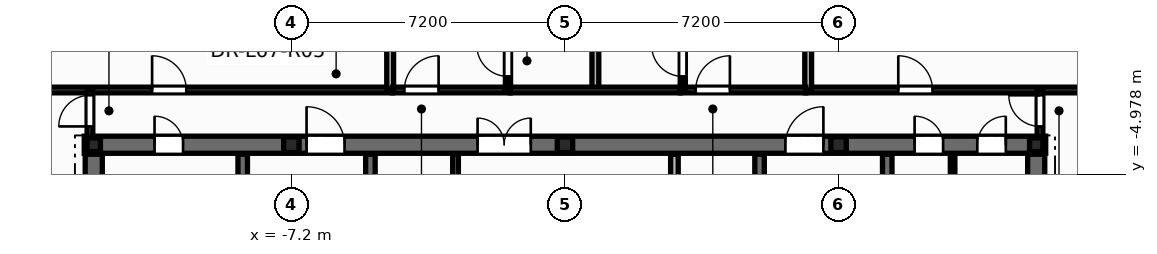
"""IFC4 building model, lengths in metres.
Left out: names, types, materials, properties, quantities, classifications, styles, units other than length and angle.
Written with IfcOpenShell. Run it as: python <this file> out.ifc"""

import sys

from ifc_helpers import new_model, si_unit, direction, frame, frame_2d, origin, origin_2d, place, context, subcontext, project, spatial, rectangle, i_section, extrude, element, fill, save


model = new_model("IFC4")
c1 = context("Model", 3, precision=1e-05, world=origin(), true_north=direction((0.0, 1.0)))
c2 = subcontext(c1, "Body", "Model", "MODEL_VIEW")
j1 = project(units=[si_unit("LENGTHUNIT", "METRE"), si_unit("PLANEANGLEUNIT", "RADIAN")], contexts=[c1])
p1 = place(None, origin())
s1 = spatial("IfcSite", under=j1, at=p1, CompositionType="ELEMENT")
p2 = place(p1, origin())
s2 = spatial("IfcBuilding", under=s1, at=p2, CompositionType="ELEMENT")
p3 = place(p2, frame((0.0, 0.0, 256.2)))
s3 = spatial("IfcBuildingStorey", under=s2, at=p3, CompositionType="ELEMENT", Elevation=256.2)
for number, where, z_axis, x_axis in (
    (1, (12.4, -4.2, 0.0), (0.0, 0.0, 1.0), (1.0, 0.0, 0.0)),
    (2, (-12.4, -4.2, 0.0), (0.0, 0.0, 1.0), (1.0, 0.0, 0.0)),
):
    element("IfcColumn", number, at=place(p3, frame(where, z_axis=z_axis, x_axis=x_axis)), inside=s3, PredefinedType="COLUMN", context=c2, shape_type="SweptSolid", body=[
        extrude(i_section(OverallWidth=0.352, OverallDepth=0.359, WebThickness=0.018, FlangeThickness=0.026, at=origin_2d()), origin(), (0.0, 0.0, 1.0), 3.6),
    ])
for number, where, z_axis, x_axis in (
    (3, (-7.2, -4.2, 0.0), (0.0, 0.0, 1.0), (1.0, 0.0, 0.0)),
    (4, (0.0, -4.2, 0.0), (0.0, 0.0, 1.0), (1.0, 0.0, 0.0)),
    (5, (7.2, -4.2, 0.0), (0.0, 0.0, 1.0), (1.0, 0.0, 0.0)),
):
    element("IfcColumn", number, at=place(p3, frame(where, z_axis=z_axis, x_axis=x_axis)), inside=s3, PredefinedType="PILASTER", context=c2, shape_type="SweptSolid", body=[
        extrude(i_section(OverallWidth=0.405, OverallDepth=0.414, WebThickness=0.022, FlangeThickness=0.032, at=origin_2d()), origin(), (0.0, 0.0, 1.0), 3.6),
    ])
p4 = place(p3, frame((-2.88, -5.6, 0.0), z_axis=(0.0, 0.0, 1.0), x_axis=(0.0, 1.0, 0.0)))
e6 = element("IfcWall", 6, at=p4, inside=s3, PredefinedType="PARTITIONING", context=c2, shape_type="SweptSolid", body=[
    extrude(rectangle(XDim=1.15, YDim=0.15, at=frame_2d((0.575, 0.0))), origin(), (0.0, 0.0, 1.0), 3.345),
])
p5 = place(p3, frame((10.2, -5.52, 0.0), z_axis=(0.0, 0.0, 1.0), x_axis=(0.0, 1.0, 0.0)))
e7 = element("IfcWall", 7, at=p5, inside=s3, PredefinedType="PARTITIONING", context=c2, shape_type="SweptSolid", body=[
    extrude(rectangle(XDim=1.12, YDim=0.12, at=frame_2d((0.56, 0.0))), origin(), (0.0, 0.0, 1.0), 3.345),
])
p6 = place(p3, frame((-12.65, -4.2, 0.0), z_axis=(0.0, 0.0, 1.0), x_axis=(1.0, 0.0, 0.0)))
e8 = element("IfcWall", 8, at=p6, inside=s3, PredefinedType="SHEAR", context=c2, shape_type="SweptSolid", body=[
    extrude(rectangle(XDim=25.3, YDim=0.45, at=frame_2d((12.65, 0.0))), origin(), (0.0, 0.0, 1.0), 3.6),
])
p7 = place(p6, frame((1.85, 0.0, 0.0)))
e9 = element("IfcOpeningElement", 9, at=p7, cuts=e8, PredefinedType="OPENING", context=c2, shape_type="SweptSolid", body=[
    extrude(rectangle(XDim=0.756, YDim=2.054, at=frame_2d((0.375, 1.027))), frame((0.0, 0.235, 0.0), z_axis=(0.0, -1.0, 0.0), x_axis=(1.0, 0.0, 0.0)), (0.0, 0.0, 1.0), 0.47),
])
p8 = place(p6, frame((21.85, 0.0, 0.0)))
e10 = element("IfcOpeningElement", 10, at=p8, cuts=e8, PredefinedType="OPENING", context=c2, shape_type="SweptSolid", body=[
    extrude(rectangle(XDim=0.756, YDim=2.054, at=frame_2d((0.375, 1.027))), frame((0.0, 0.235, 0.0), z_axis=(0.0, -1.0, 0.0), x_axis=(1.0, 0.0, 0.0)), (0.0, 0.0, 1.0), 0.47),
])
p9 = place(p6, frame((23.5, 0.0, 0.0)))
e11 = element("IfcOpeningElement", 11, at=p9, cuts=e8, PredefinedType="OPENING", context=c2, shape_type="SweptSolid", body=[
    extrude(rectangle(XDim=0.756, YDim=2.054, at=frame_2d((0.375, 1.027))), frame((0.0, 0.235, 0.0), z_axis=(0.0, -1.0, 0.0), x_axis=(1.0, 0.0, 0.0)), (0.0, 0.0, 1.0), 0.47),
])
p10 = place(p6, frame((5.85, 0.0, 0.0)))
e12 = element("IfcOpeningElement", 12, at=p10, cuts=e8, PredefinedType="OPENING", context=c2, shape_type="SweptSolid", body=[
    extrude(rectangle(XDim=1.006, YDim=2.104, at=frame_2d((0.5, 1.052))), frame((0.0, 0.235, 0.0), z_axis=(0.0, -1.0, 0.0), x_axis=(1.0, 0.0, 0.0)), (0.0, 0.0, 1.0), 0.47),
])
p11 = place(p6, frame((10.35, 0.0, 0.0)))
e13 = element("IfcOpeningElement", 13, at=p11, cuts=e8, PredefinedType="OPENING", context=c2, shape_type="SweptSolid", body=[
    extrude(rectangle(XDim=1.406, YDim=2.154, at=frame_2d((0.7, 1.077))), frame((0.0, 0.235, 0.0), z_axis=(0.0, -1.0, 0.0), x_axis=(1.0, 0.0, 0.0)), (0.0, 0.0, 1.0), 0.47),
])
p12 = place(p6, frame((18.45, 0.0, 0.0)))
e14 = element("IfcOpeningElement", 14, at=p12, cuts=e8, PredefinedType="OPENING", context=c2, shape_type="SweptSolid", body=[
    extrude(rectangle(XDim=1.006, YDim=2.104, at=frame_2d((0.5, 1.052))), frame((0.0, 0.235, 0.0), z_axis=(0.0, -1.0, 0.0), x_axis=(1.0, 0.0, 0.0)), (0.0, 0.0, 1.0), 0.47),
])
p13 = place(p3, frame((-8.48, -13.85, 0.0), z_axis=(0.0, 0.0, 1.0), x_axis=(0.0, 1.0, 0.0)))
e15 = element("IfcWall", 15, at=p13, inside=s3, PredefinedType="SHEAR", context=c2, shape_type="SweptSolid", body=[
    extrude(rectangle(XDim=9.4, YDim=0.25, at=frame_2d((4.7, 0.0))), origin(), (0.0, 0.0, 1.0), 3.6),
])
p14 = place(p13, frame((6.95, 0.0, 0.0)))
e16 = element("IfcOpeningElement", 16, at=p14, cuts=e15, PredefinedType="OPENING", context=c2, shape_type="SweptSolid", body=[
    extrude(rectangle(XDim=1.006, YDim=2.104, at=frame_2d((0.5, 1.052))), frame((0.0, 0.135, 0.0), z_axis=(0.0, -1.0, 0.0), x_axis=(1.0, 0.0, 0.0)), (0.0, 0.0, 1.0), 0.27),
])
p15 = place(p3, frame((8.48, -13.85, 0.0), z_axis=(0.0, 0.0, 1.0), x_axis=(0.0, 1.0, 0.0)))
e17 = element("IfcWall", 17, at=p15, inside=s3, PredefinedType="SHEAR", context=c2, shape_type="SweptSolid", body=[
    extrude(rectangle(XDim=9.4, YDim=0.25, at=frame_2d((4.7, 0.0))), origin(), (0.0, 0.0, 1.0), 3.6),
])
p16 = place(p15, frame((6.95, 0.0, 0.0)))
e18 = element("IfcOpeningElement", 18, at=p16, cuts=e17, PredefinedType="OPENING", context=c2, shape_type="SweptSolid", body=[
    extrude(rectangle(XDim=1.006, YDim=2.104, at=frame_2d((0.5, 1.052))), frame((0.0, 0.135, 0.0), z_axis=(0.0, -1.0, 0.0), x_axis=(1.0, 0.0, 0.0)), (0.0, 0.0, 1.0), 0.27),
])
for number, where, z_axis, x_axis in (
    (19, (-5.12, -13.85, 0.0), (0.0, 0.0, 1.0), (0.0, 1.0, 0.0)),
    (20, (5.12, -13.85, 0.0), (0.0, 0.0, 1.0), (0.0, 1.0, 0.0)),
):
    element("IfcWall", number, at=place(p3, frame(where, z_axis=z_axis, x_axis=x_axis)), inside=s3, PredefinedType="SHEAR", context=c2, shape_type="SweptSolid", body=[
        extrude(rectangle(XDim=9.4, YDim=0.25, at=frame_2d((4.7, 0.0))), origin(), (0.0, 0.0, 1.0), 3.6),
    ])
for number, where, z_axis, x_axis in (
    (21, (-12.4, -13.85, 0.0), (0.0, 0.0, 1.0), (0.0, 1.0, 0.0)),
    (22, (12.4, -13.85, 0.0), (0.0, 0.0, 1.0), (0.0, 1.0, 0.0)),
):
    element("IfcWall", number, at=place(p3, frame(where, z_axis=z_axis, x_axis=x_axis)), inside=s3, PredefinedType="SHEAR", context=c2, shape_type="SweptSolid", body=[
        extrude(rectangle(XDim=9.4, YDim=0.45, at=frame_2d((4.7, 0.0))), origin(), (0.0, 0.0, 1.0), 3.6),
    ])
p17 = place(p3, frame((2.88, -9.45, 0.0), z_axis=(0.0, 0.0, 1.0), x_axis=(0.0, 1.0, 0.0)))
e23 = element("IfcWall", 23, at=p17, inside=s3, PredefinedType="SOLIDWALL", context=c2, shape_type="SweptSolid", body=[
    extrude(rectangle(XDim=5.0, YDim=0.2, at=frame_2d((2.5, 0.0))), origin(), (0.0, 0.0, 1.0), 3.345),
])
p18 = place(p17, frame((2.05, 0.0, 0.0)))
e24 = element("IfcOpeningElement", 24, at=p18, cuts=e23, PredefinedType="OPENING", context=c2, shape_type="SweptSolid", body=[
    extrude(rectangle(XDim=0.926, YDim=2.104, at=frame_2d((0.46, 1.052))), frame((0.0, 0.11, 0.0), z_axis=(0.0, -1.0, 0.0), x_axis=(1.0, 0.0, 0.0)), (0.0, 0.0, 1.0), 0.22),
])
p19 = place(p3, frame((-14.42, -2.76, 0.0), z_axis=(0.0, 0.0, 1.0), x_axis=(1.0, 0.0, 0.0)))
e25 = element("IfcWall", 25, at=p19, inside=s3, PredefinedType="PARTITIONING", context=c2, shape_type="SweptSolid", body=[
    extrude(rectangle(XDim=9.88, YDim=0.15, at=frame_2d((4.94, 0.0))), origin(), (0.0, 0.0, 1.0), 2.32),
])
p20 = place(p19, frame((3.555, 0.0, 0.0)))
e26 = element("IfcOpeningElement", 26, at=p20, cuts=e25, PredefinedType="OPENING", context=c2, shape_type="SweptSolid", body=[
    extrude(rectangle(XDim=0.906, YDim=2.104, at=frame_2d((0.45, 1.052))), frame((0.0, 0.085, 0.0), z_axis=(0.0, -1.0, 0.0), x_axis=(1.0, 0.0, 0.0)), (0.0, 0.0, 1.0), 0.17),
])
p21 = place(p3, frame((6.34, -2.76, 0.0), z_axis=(0.0, 0.0, 1.0), x_axis=(1.0, 0.0, 0.0)))
e27 = element("IfcWall", 27, at=p21, inside=s3, PredefinedType="PARTITIONING", context=c2, shape_type="SweptSolid", body=[
    extrude(rectangle(XDim=8.08, YDim=0.15, at=frame_2d((4.04, 0.0))), origin(), (0.0, 0.0, 1.0), 2.32),
])
p22 = place(p21, frame((2.431, 0.0, 0.0)))
e28 = element("IfcOpeningElement", 28, at=p22, cuts=e27, PredefinedType="OPENING", context=c2, shape_type="SweptSolid", body=[
    extrude(rectangle(XDim=0.906, YDim=2.104, at=frame_2d((0.45, 1.052))), frame((0.0, 0.085, 0.0), z_axis=(0.0, -1.0, 0.0), x_axis=(1.0, 0.0, 0.0)), (0.0, 0.0, 1.0), 0.17),
])
p23 = place(p3, frame((-4.6, -2.74, 0.0), z_axis=(0.0, 0.0, 1.0), x_axis=(0.0, 1.0, 0.0)))
e29 = element("IfcWall", 29, at=p23, inside=s3, PredefinedType="PARTITIONING", context=c2, shape_type="SweptSolid", body=[
    extrude(rectangle(XDim=13.693, YDim=0.18, at=frame_2d((6.847, 0.0))), origin(), (0.0, 0.0, 1.0), 2.32),
])
p24 = place(p3, frame((6.4, -2.76, 0.0), z_axis=(0.0, 0.0, 1.0), x_axis=(0.0, 1.0, 0.0)))
e30 = element("IfcWall", 30, at=p24, inside=s3, PredefinedType="PARTITIONING", context=c2, shape_type="SweptSolid", body=[
    extrude(rectangle(XDim=10.96, YDim=0.18, at=frame_2d((5.48, 0.0))), origin(), (0.0, 0.0, 1.0), 2.32),
])
p25 = place(p3, frame((0.8, -2.76, 0.0), z_axis=(0.0, 0.0, 1.0), x_axis=(0.0, 1.0, 0.0)))
e31 = element("IfcWall", 31, at=p25, inside=s3, PredefinedType="PARTITIONING", context=c2, shape_type="SweptSolid", body=[
    extrude(rectangle(XDim=16.697, YDim=0.18, at=frame_2d((8.348, 0.0))), origin(), (0.0, 0.0, 1.0), 2.32),
])
p26 = place(p3, frame((3.04, -2.76, 0.0), z_axis=(0.0, 0.0, 1.0), x_axis=(1.0, 0.0, 0.0)))
e32 = element("IfcWall", 32, at=p26, inside=s3, PredefinedType="PARTITIONING", context=c2, shape_type="SweptSolid", body=[
    extrude(rectangle(XDim=3.298, YDim=0.15, at=frame_2d((1.649, 0.0))), origin(), (0.0, 0.0, 1.0), 2.964),
])
p27 = place(p26, frame((0.4, 0.0, 0.0)))
e33 = element("IfcOpeningElement", 33, at=p27, cuts=e32, PredefinedType="OPENING", context=c2, shape_type="SweptSolid", body=[
    extrude(rectangle(XDim=0.906, YDim=2.104, at=frame_2d((0.45, 1.052))), frame((0.0, 0.085, 0.0), z_axis=(0.0, -1.0, 0.0), x_axis=(1.0, 0.0, 0.0)), (0.0, 0.0, 1.0), 0.17),
])
p28 = place(p3, frame((-4.538, -2.76, 0.0), z_axis=(0.0, 0.0, 1.0), x_axis=(1.0, 0.0, 0.0)))
e34 = element("IfcWall", 34, at=p28, inside=s3, PredefinedType="PARTITIONING", context=c2, shape_type="SweptSolid", body=[
    extrude(rectangle(XDim=3.098, YDim=0.15, at=frame_2d((1.549, 0.0))), origin(), (0.0, 0.0, 1.0), 2.964),
])
p29 = place(p28, frame((0.312, 0.0, 0.0)))
e35 = element("IfcOpeningElement", 35, at=p29, cuts=e34, PredefinedType="OPENING", context=c2, shape_type="SweptSolid", body=[
    extrude(rectangle(XDim=0.906, YDim=2.104, at=frame_2d((0.45, 1.052))), frame((0.0, 0.085, 0.0), z_axis=(0.0, -1.0, 0.0), x_axis=(1.0, 0.0, 0.0)), (0.0, 0.0, 1.0), 0.17),
])
p30 = place(p3, frame((-1.5, -2.76, 0.0), z_axis=(0.0, 0.0, 1.0), x_axis=(0.0, 1.0, 0.0)))
e36 = element("IfcWall", 36, at=p30, inside=s3, PredefinedType="PARTITIONING", context=c2, shape_type="SweptSolid", body=[
    extrude(rectangle(XDim=2.92, YDim=0.135, at=frame_2d((1.46, 0.0))), origin(), (0.0, 0.0, 1.0), 3.345),
])
p31 = place(p30, frame((0.357, 0.0, 0.0)))
e37 = element("IfcOpeningElement", 37, at=p31, cuts=e36, PredefinedType="OPENING", context=c2, shape_type="SweptSolid", body=[
    extrude(rectangle(XDim=0.826, YDim=2.104, at=frame_2d((0.41, 1.052))), frame((0.0, 0.078, 0.0), z_axis=(0.0, -1.0, 0.0), x_axis=(1.0, 0.0, 0.0)), (0.0, 0.0, 1.0), 0.155),
])
p32 = place(p3, frame((3.1, -2.76, 0.0), z_axis=(0.0, 0.0, 1.0), x_axis=(0.0, 1.0, 0.0)))
e38 = element("IfcWall", 38, at=p32, inside=s3, PredefinedType="PARTITIONING", context=c2, shape_type="SweptSolid", body=[
    extrude(rectangle(XDim=2.92, YDim=0.135, at=frame_2d((1.46, 0.0))), origin(), (0.0, 0.0, 1.0), 3.345),
])
p33 = place(p32, frame((0.357, 0.0, 0.0)))
e39 = element("IfcOpeningElement", 39, at=p33, cuts=e38, PredefinedType="OPENING", context=c2, shape_type="SweptSolid", body=[
    extrude(rectangle(XDim=0.826, YDim=2.104, at=frame_2d((0.41, 1.052))), frame((0.0, 0.078, 0.0), z_axis=(0.0, -1.0, 0.0), x_axis=(1.0, 0.0, 0.0)), (0.0, 0.0, 1.0), 0.155),
])
p34 = place(p3, frame((-1.438, -2.76, 0.0), z_axis=(0.0, 0.0, 1.0), x_axis=(1.0, 0.0, 0.0)))
e40 = element("IfcWall", 40, at=p34, inside=s3, PredefinedType="PARTITIONING", context=c2, shape_type="SweptSolid", body=[
    extrude(rectangle(XDim=4.476, YDim=0.15, at=frame_2d((2.238, 0.0))), origin(), (0.0, 0.0, 1.0), 2.32),
])
p35 = place(p3, frame((-12.5, -4.24, 0.0), z_axis=(0.0, 0.0, 1.0), x_axis=(0.0, 1.0, 0.0)))
e41 = element("IfcWall", 41, at=p35, inside=s3, PredefinedType="PARTITIONING", context=c2, shape_type="SweptSolid", body=[
    extrude(rectangle(XDim=1.48, YDim=0.15, at=frame_2d((0.74, 0.0))), origin(), (0.0, 0.0, 1.0), 2.32),
])
p36 = place(p35, frame((0.522, 0.0, 0.0)))
e42 = element("IfcOpeningElement", 42, at=p36, cuts=e41, PredefinedType="OPENING", context=c2, shape_type="SweptSolid", body=[
    extrude(rectangle(XDim=0.826, YDim=2.104, at=frame_2d((0.41, 1.052))), frame((0.0, 0.085, 0.0), z_axis=(0.0, -1.0, 0.0), x_axis=(1.0, 0.0, 0.0)), (0.0, 0.0, 1.0), 0.17),
])
p37 = place(p3, frame((12.5, -4.24, 0.0), z_axis=(0.0, 0.0, 1.0), x_axis=(0.0, 1.0, 0.0)))
e43 = element("IfcWall", 43, at=p37, inside=s3, PredefinedType="PARTITIONING", context=c2, shape_type="SweptSolid", body=[
    extrude(rectangle(XDim=1.48, YDim=0.15, at=frame_2d((0.74, 0.0))), origin(), (0.0, 0.0, 1.0), 2.32),
])
p38 = place(p37, frame((0.522, 0.0, 0.0)))
e44 = element("IfcOpeningElement", 44, at=p38, cuts=e43, PredefinedType="OPENING", context=c2, shape_type="SweptSolid", body=[
    extrude(rectangle(XDim=0.826, YDim=2.104, at=frame_2d((0.41, 1.052))), frame((0.0, 0.085, 0.0), z_axis=(0.0, -1.0, 0.0), x_axis=(1.0, 0.0, 0.0)), (0.0, 0.0, 1.0), 0.17),
])
p39 = place(p7, origin())
e45 = element("IfcDoor", 45, at=p39, inside=s3, OperationType="SINGLE_SWING_LEFT", PredefinedType="DOOR", context=c2, shape_type="SweptSolid", body=[
    extrude(rectangle(XDim=0.75, YDim=2.05, at=frame_2d((0.375, 1.025))), frame((0.0, 0.025, 0.0), z_axis=(0.0, -1.0, 0.0), x_axis=(1.0, 0.0, 0.0)), (0.0, 0.0, 1.0), 0.05),
])
fill(e9, e45)
p40 = place(p8, origin())
e46 = element("IfcDoor", 46, at=p40, inside=s3, OperationType="SINGLE_SWING_LEFT", PredefinedType="DOOR", context=c2, shape_type="SweptSolid", body=[
    extrude(rectangle(XDim=0.75, YDim=2.05, at=frame_2d((0.375, 1.025))), frame((0.0, 0.025, 0.0), z_axis=(0.0, -1.0, 0.0), x_axis=(1.0, 0.0, 0.0)), (0.0, 0.0, 1.0), 0.05),
])
fill(e10, e46)
p41 = place(p9, origin())
e47 = element("IfcDoor", 47, at=p41, inside=s3, OperationType="SINGLE_SWING_RIGHT", PredefinedType="DOOR", context=c2, shape_type="SweptSolid", body=[
    extrude(rectangle(XDim=0.75, YDim=2.05, at=frame_2d((0.375, 1.025))), frame((0.0, 0.025, 0.0), z_axis=(0.0, -1.0, 0.0), x_axis=(1.0, 0.0, 0.0)), (0.0, 0.0, 1.0), 0.05),
])
fill(e11, e47)
p42 = place(p10, origin())
e48 = element("IfcDoor", 48, at=p42, inside=s3, OperationType="SINGLE_SWING_LEFT", PredefinedType="DOOR", context=c2, shape_type="SweptSolid", body=[
    extrude(rectangle(XDim=1.0, YDim=2.1, at=frame_2d((0.5, 1.05))), frame((0.0, 0.025, 0.0), z_axis=(0.0, -1.0, 0.0), x_axis=(1.0, 0.0, 0.0)), (0.0, 0.0, 1.0), 0.05),
])
fill(e12, e48)
p43 = place(p11, origin())
e49 = element("IfcDoor", 49, at=p43, inside=s3, OperationType="DOUBLE_DOOR_SINGLE_SWING", PredefinedType="DOOR", context=c2, shape_type="SweptSolid", body=[
    extrude(rectangle(XDim=1.4, YDim=2.15, at=frame_2d((0.7, 1.075))), frame((0.0, 0.025, 0.0), z_axis=(0.0, -1.0, 0.0), x_axis=(1.0, 0.0, 0.0)), (0.0, 0.0, 1.0), 0.05),
])
fill(e13, e49)
p44 = place(p12, origin())
e50 = element("IfcDoor", 50, at=p44, inside=s3, OperationType="SINGLE_SWING_RIGHT", PredefinedType="DOOR", context=c2, shape_type="SweptSolid", body=[
    extrude(rectangle(XDim=1.0, YDim=2.1, at=frame_2d((0.5, 1.05))), frame((0.0, 0.025, 0.0), z_axis=(0.0, -1.0, 0.0), x_axis=(1.0, 0.0, 0.0)), (0.0, 0.0, 1.0), 0.05),
])
fill(e14, e50)
p45 = place(p36, origin())
e51 = element("IfcDoor", 51, at=p45, inside=s3, OperationType="SINGLE_SWING_LEFT", PredefinedType="DOOR", context=c2, shape_type="SweptSolid", body=[
    extrude(rectangle(XDim=0.82, YDim=2.1, at=frame_2d((0.41, 1.05))), frame((0.0, 0.025, 0.0), z_axis=(0.0, -1.0, 0.0), x_axis=(1.0, 0.0, 0.0)), (0.0, 0.0, 1.0), 0.05),
])
fill(e42, e51)
p46 = place(p38, origin())
e52 = element("IfcDoor", 52, at=p46, inside=s3, OperationType="SINGLE_SWING_RIGHT", PredefinedType="DOOR", context=c2, shape_type="SweptSolid", body=[
    extrude(rectangle(XDim=0.82, YDim=2.1, at=frame_2d((0.41, 1.05))), frame((0.0, 0.025, 0.0), z_axis=(0.0, -1.0, 0.0), x_axis=(1.0, 0.0, 0.0)), (0.0, 0.0, 1.0), 0.05),
])
fill(e44, e52)
p47 = place(p20, origin())
e53 = element("IfcDoor", 53, at=p47, inside=s3, OperationType="SINGLE_SWING_LEFT", PredefinedType="DOOR", context=c2, shape_type="SweptSolid", body=[
    extrude(rectangle(XDim=0.9, YDim=2.1, at=frame_2d((0.45, 1.05))), frame((0.0, 0.025, 0.0), z_axis=(0.0, -1.0, 0.0), x_axis=(1.0, 0.0, 0.0)), (0.0, 0.0, 1.0), 0.05),
])
fill(e26, e53)
p48 = place(p31, origin())
e54 = element("IfcDoor", 54, at=p48, inside=s3, OperationType="SINGLE_SWING_RIGHT", PredefinedType="DOOR", context=c2, shape_type="SweptSolid", body=[
    extrude(rectangle(XDim=0.82, YDim=2.1, at=frame_2d((0.41, 1.05))), frame((0.0, 0.025, 0.0), z_axis=(0.0, -1.0, 0.0), x_axis=(1.0, 0.0, 0.0)), (0.0, 0.0, 1.0), 0.05),
])
fill(e37, e54)
p49 = place(p29, origin())
e55 = element("IfcDoor", 55, at=p49, inside=s3, OperationType="SINGLE_SWING_RIGHT", PredefinedType="DOOR", context=c2, shape_type="SweptSolid", body=[
    extrude(rectangle(XDim=0.9, YDim=2.1, at=frame_2d((0.45, 1.05))), frame((0.0, 0.025, 0.0), z_axis=(0.0, -1.0, 0.0), x_axis=(1.0, 0.0, 0.0)), (0.0, 0.0, 1.0), 0.05),
])
fill(e35, e55)
p50 = place(p33, origin())
e56 = element("IfcDoor", 56, at=p50, inside=s3, OperationType="SINGLE_SWING_RIGHT", PredefinedType="DOOR", context=c2, shape_type="SweptSolid", body=[
    extrude(rectangle(XDim=0.82, YDim=2.1, at=frame_2d((0.41, 1.05))), frame((0.0, 0.025, 0.0), z_axis=(0.0, -1.0, 0.0), x_axis=(1.0, 0.0, 0.0)), (0.0, 0.0, 1.0), 0.05),
])
fill(e39, e56)
p51 = place(p27, origin())
e57 = element("IfcDoor", 57, at=p51, inside=s3, OperationType="SINGLE_SWING_RIGHT", PredefinedType="DOOR", context=c2, shape_type="SweptSolid", body=[
    extrude(rectangle(XDim=0.9, YDim=2.1, at=frame_2d((0.45, 1.05))), frame((0.0, 0.025, 0.0), z_axis=(0.0, -1.0, 0.0), x_axis=(1.0, 0.0, 0.0)), (0.0, 0.0, 1.0), 0.05),
])
fill(e33, e57)
p52 = place(p22, origin())
e58 = element("IfcDoor", 58, at=p52, inside=s3, OperationType="SINGLE_SWING_LEFT", PredefinedType="DOOR", context=c2, shape_type="SweptSolid", body=[
    extrude(rectangle(XDim=0.9, YDim=2.1, at=frame_2d((0.45, 1.05))), frame((0.0, 0.025, 0.0), z_axis=(0.0, -1.0, 0.0), x_axis=(1.0, 0.0, 0.0)), (0.0, 0.0, 1.0), 0.05),
])
fill(e28, e58)
save(model, sys.argv[1])
